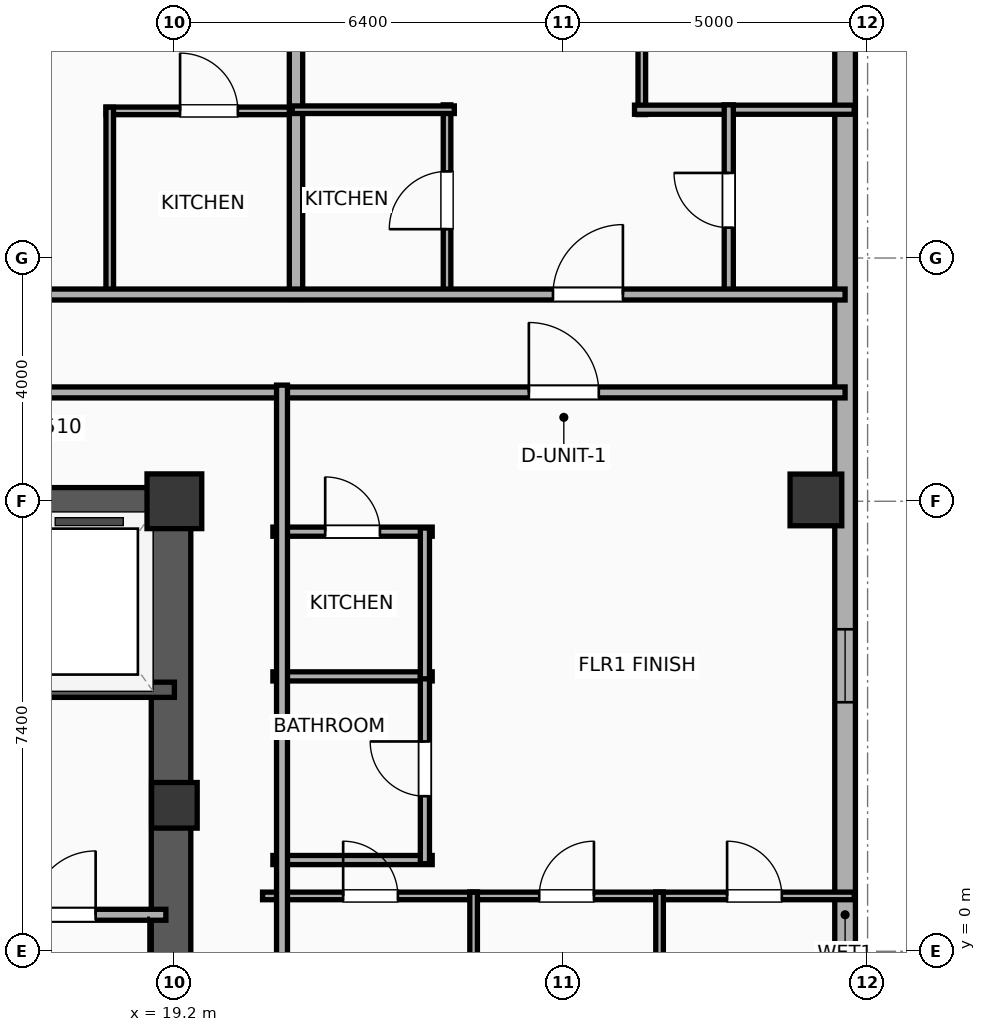
"""IFC4 building model, lengths in metres.
Left out: names, types, materials, properties, quantities, classifications, styles, units other than length and angle.
Written with IfcOpenShell. Run it as: python <this file> out.ifc"""

import sys

from ifc_helpers import new_model, si_unit, direction, frame, frame_2d, origin, origin_2d, place, context, subcontext, project, spatial, rectangle, hollow_rectangle, extrude, element, fill, save


model = new_model("IFC4")
c1 = context("Model", 3, precision=1e-05, world=origin(), true_north=direction((0.0, 1.0)))
c2 = subcontext(c1, "Body", "Model", "MODEL_VIEW")
j1 = project(units=[si_unit("LENGTHUNIT", "METRE"), si_unit("PLANEANGLEUNIT", "RADIAN")], contexts=[c1])
p1 = place(None, origin())
s1 = spatial("IfcSite", under=j1, at=p1, CompositionType="ELEMENT")
p2 = place(p1, origin())
s2 = spatial("IfcBuilding", under=s1, at=p2, CompositionType="ELEMENT")
p3 = place(p2, frame((0.0, 0.0, 219.7)))
s3 = spatial("IfcBuildingStorey", under=s2, at=p3, CompositionType="ELEMENT", Elevation=219.7)
p4 = place(p3, frame((19.2, 2.4, 0.0), z_axis=(0.0, 0.0, 1.0), x_axis=(1.0, 0.0, 0.0)))
e1 = element("IfcColumn", 1, at=p4, inside=s3, PredefinedType="COLUMN", context=c2, shape_type="SweptSolid", body=[
    extrude(rectangle(XDim=0.75, YDim=0.75, at=origin_2d()), origin(), (0.0, 0.0, 1.0), 3.9),
])
p5 = place(p3, frame((19.2, 7.4, 0.0), z_axis=(0.0, 0.0, 1.0), x_axis=(1.0, 0.0, 0.0)))
e2 = element("IfcColumn", 2, at=p5, inside=s3, PredefinedType="COLUMN", context=c2, shape_type="SweptSolid", body=[
    extrude(rectangle(XDim=0.9, YDim=0.9, at=origin_2d()), origin(), (0.0, 0.0, 1.0), 3.9),
])
p6 = place(p3, frame((12.175, 7.4, 0.0), z_axis=(0.0, 0.0, 1.0), x_axis=(1.0, 0.0, 0.0)))
e3 = element("IfcWall", 3, at=p6, inside=s3, PredefinedType="SHEAR", context=c2, shape_type="SweptSolid", body=[
    extrude(rectangle(XDim=7.25, YDim=0.45, at=frame_2d((3.625, 0.0))), origin(), (0.0, 0.0, 1.0), 3.65),
])
p7 = place(p3, frame((19.145, -7.4, 0.0), z_axis=(0.0, 0.0, 1.0), x_axis=(0.0, 1.0, 0.0)))
e4 = element("IfcWall", 4, at=p7, inside=s3, PredefinedType="SHEAR", context=c2, shape_type="SweptSolid", body=[
    extrude(rectangle(XDim=14.8, YDim=0.65, at=frame_2d((7.4, 0.0))), origin(), (0.0, 0.0, 1.0), 3.65),
])
p8 = place(p3, frame((29.75, 7.422, 0.0), z_axis=(0.0, 0.0, 1.0), x_axis=(1.0, 0.0, 0.0)))
e5 = element("IfcColumn", 5, at=p8, inside=s3, PredefinedType="COLUMN", context=c2, shape_type="SweptSolid", body=[
    extrude(hollow_rectangle(XDim=0.85, YDim=0.85, WallThickness=0.028, at=origin_2d()), origin(), (0.0, 0.0, 1.0), 3.9),
])
p9 = place(p3, frame((30.23, 16.583, 0.0), z_axis=(0.0, 0.0, 1.0), x_axis=(0.0, -1.0, 0.0)))
e6 = element("IfcWall", 6, at=p9, inside=s3, PredefinedType="ELEMENTEDWALL", context=c2, shape_type="SweptSolid", body=[
    extrude(rectangle(XDim=31.967, YDim=0.34, at=frame_2d((15.983, 0.0))), origin(), (0.0, 0.0, 1.0), 3.65),
])
p10 = place(p9, frame((30.132, 0.0, 0.75)))
e7 = element("IfcOpeningElement", 7, at=p10, cuts=e6, PredefinedType="OPENING", context=c2, shape_type="SweptSolid", body=[
    extrude(rectangle(XDim=1.2, YDim=2.05, at=frame_2d((0.6, 1.025))), frame((0.0, 0.18, 0.0), z_axis=(0.0, -1.0, 0.0), x_axis=(1.0, 0.0, 0.0)), (0.0, 0.0, 1.0), 0.36),
])
p11 = place(p9, frame((11.288, 0.0, 0.75)))
e8 = element("IfcOpeningElement", 8, at=p11, cuts=e6, PredefinedType="OPENING", context=c2, shape_type="SweptSolid", body=[
    extrude(rectangle(XDim=1.2, YDim=2.05, at=frame_2d((0.6, 1.025))), frame((0.0, 0.18, 0.0), z_axis=(0.0, -1.0, 0.0), x_axis=(1.0, 0.0, 0.0)), (0.0, 0.0, 1.0), 0.36),
])
p12 = place(p9, frame((20.538, 0.0, 0.75)))
e9 = element("IfcOpeningElement", 9, at=p12, cuts=e6, PredefinedType="OPENING", context=c2, shape_type="SweptSolid", body=[
    extrude(rectangle(XDim=1.2, YDim=2.05, at=frame_2d((0.6, 1.025))), frame((0.0, 0.18, 0.0), z_axis=(0.0, -1.0, 0.0), x_axis=(1.0, 0.0, 0.0)), (0.0, 0.0, 1.0), 0.36),
])
p13 = place(p3, frame((16.6, 4.3, 0.0), z_axis=(0.0, 0.0, 1.0), x_axis=(1.0, 0.0, 0.0)))
e10 = element("IfcWall", 10, at=p13, inside=s3, PredefinedType="SOLIDWALL", context=c2, shape_type="SweptSolid", body=[
    extrude(rectangle(XDim=2.6, YDim=0.25, at=frame_2d((1.3, 0.0))), origin(), (0.0, 0.0, 1.0), 3.65),
])
p14 = place(p3, frame((15.7, 0.6, 0.0), z_axis=(0.0, 0.0, 1.0), x_axis=(1.0, 0.0, 0.0)))
e11 = element("IfcWall", 11, at=p14, inside=s3, PredefinedType="PARTITIONING", context=c2, shape_type="SweptSolid", body=[
    extrude(rectangle(XDim=3.36, YDim=0.18, at=frame_2d((1.68, 0.0))), origin(), (0.0, 0.0, 1.0), 3.65),
])
p15 = place(p14, frame((1.155, 0.0, 0.0)))
e12 = element("IfcOpeningElement", 12, at=p15, cuts=e11, PredefinedType="OPENING", context=c2, shape_type="SweptSolid", body=[
    extrude(rectangle(XDim=1.05, YDim=2.05, at=frame_2d((0.525, 1.025))), frame((0.0, 0.1, 0.0), z_axis=(0.0, -1.0, 0.0), x_axis=(1.0, 0.0, 0.0)), (0.0, 0.0, 1.0), 0.2),
])
p16 = place(p3, frame((9.88, 9.19, 0.0), z_axis=(0.0, 0.0, 1.0), x_axis=(1.0, 0.0, 0.0)))
e13 = element("IfcWall", 13, at=p16, inside=s3, PredefinedType="PARTITIONING", context=c2, shape_type="SweptSolid", body=[
    extrude(rectangle(XDim=20.35, YDim=0.18, at=frame_2d((10.175, 0.0))), origin(), (0.0, 0.0, 1.0), 3.65),
])
p17 = place(p16, frame((15.149, 0.0, 0.0)))
e14 = element("IfcOpeningElement", 14, at=p17, cuts=e13, PredefinedType="OPENING", context=c2, shape_type="SweptSolid", body=[
    extrude(rectangle(XDim=1.15, YDim=2.05, at=frame_2d((0.575, 1.025))), frame((0.0, 0.1, 0.0), z_axis=(0.0, -1.0, 0.0), x_axis=(1.0, 0.0, 0.0)), (0.0, 0.0, 1.0), 0.2),
])
p18 = place(p3, frame((18.077, 13.82, 0.0), z_axis=(0.0, 0.0, 1.0), x_axis=(1.0, 0.0, 0.0)))
e15 = element("IfcWall", 15, at=p18, inside=s3, PredefinedType="PARTITIONING", context=c2, shape_type="SweptSolid", body=[
    extrude(rectangle(XDim=3.186, YDim=0.125, at=frame_2d((1.593, 0.0))), origin(), (0.0, 0.0, 1.0), 3.65),
])
p19 = place(p18, frame((1.217, 0.0, 0.0)))
e16 = element("IfcOpeningElement", 16, at=p19, cuts=e15, PredefinedType="OPENING", context=c2, shape_type="SweptSolid", body=[
    extrude(rectangle(XDim=0.95, YDim=2.05, at=frame_2d((0.475, 1.025))), frame((0.0, 0.073, 0.0), z_axis=(0.0, -1.0, 0.0), x_axis=(1.0, 0.0, 0.0)), (0.0, 0.0, 1.0), 0.145),
])
p20 = place(p3, frame((18.137, 10.78, 0.0), z_axis=(0.0, 0.0, 1.0), x_axis=(0.0, 1.0, 0.0)))
e17 = element("IfcWall", 17, at=p20, inside=s3, PredefinedType="PARTITIONING", context=c2, shape_type="SweptSolid", body=[
    extrude(rectangle(XDim=3.1, YDim=0.125, at=frame_2d((1.55, 0.0))), origin(), (0.0, 0.0, 1.0), 3.65),
])
p21 = place(p3, frame((21.2, 10.72, 0.0), z_axis=(0.0, 0.0, 1.0), x_axis=(0.0, 1.0, 0.0)))
e18 = element("IfcWall", 18, at=p21, inside=s3, PredefinedType="PARTITIONING", context=c2, shape_type="SweptSolid", body=[
    extrude(rectangle(XDim=9.31, YDim=0.22, at=frame_2d((4.655, 0.0))), origin(), (0.0, 0.0, 1.0), 3.65),
])
p22 = place(p3, frame((26.887, 13.759, 0.0), z_axis=(0.0, 0.0, 1.0), x_axis=(0.0, 1.0, 0.0)))
e19 = element("IfcWall", 19, at=p22, inside=s3, PredefinedType="PARTITIONING", context=c2, shape_type="SweptSolid", body=[
    extrude(rectangle(XDim=6.403, YDim=0.125, at=frame_2d((3.202, 0.0))), origin(), (0.0, 0.0, 1.0), 3.65),
])
p23 = place(p22, frame((1.087, 0.0, 0.0)))
e20 = element("IfcOpeningElement", 20, at=p23, cuts=e19, PredefinedType="OPENING", context=c2, shape_type="SweptSolid", body=[
    extrude(rectangle(XDim=0.9, YDim=2.05, at=frame_2d((0.45, 1.025))), frame((0.0, 0.073, 0.0), z_axis=(0.0, -1.0, 0.0), x_axis=(1.0, 0.0, 0.0)), (0.0, 0.0, 1.0), 0.145),
])
p24 = place(p3, frame((26.767, 13.839, 0.0), z_axis=(0.0, 0.0, 1.0), x_axis=(1.0, 0.0, 0.0)))
e21 = element("IfcWall", 21, at=p24, inside=s3, PredefinedType="PLUMBINGWALL", context=c2, shape_type="SweptSolid", body=[
    extrude(rectangle(XDim=3.613, YDim=0.15, at=frame_2d((1.806, 0.0))), origin(), (0.0, 0.0, 1.0), 3.65),
])
p25 = place(p3, frame((23.684, 10.78, 0.0), z_axis=(0.0, 0.0, 1.0), x_axis=(0.0, 1.0, 0.0)))
e22 = element("IfcWall", 22, at=p25, inside=s3, PredefinedType="PARTITIONING", context=c2, shape_type="SweptSolid", body=[
    extrude(rectangle(XDim=3.139, YDim=0.125, at=frame_2d((1.569, 0.0))), origin(), (0.0, 0.0, 1.0), 3.65),
])
p26 = place(p25, frame((1.094, 0.0, 0.0)))
e23 = element("IfcOpeningElement", 23, at=p26, cuts=e22, PredefinedType="OPENING", context=c2, shape_type="SweptSolid", body=[
    extrude(rectangle(XDim=0.95, YDim=2.05, at=frame_2d((0.475, 1.025))), frame((0.0, 0.073, 0.0), z_axis=(0.0, -1.0, 0.0), x_axis=(1.0, 0.0, 0.0)), (0.0, 0.0, 1.0), 0.145),
])
p27 = place(p3, frame((21.137, 13.839, 0.0), z_axis=(0.0, 0.0, 1.0), x_axis=(1.0, 0.0, 0.0)))
e24 = element("IfcWall", 24, at=p27, inside=s3, PredefinedType="PARTITIONING", context=c2, shape_type="SweptSolid", body=[
    extrude(rectangle(XDim=2.667, YDim=0.125, at=frame_2d((1.333, 0.0))), origin(), (0.0, 0.0, 1.0), 3.65),
])
p28 = place(p3, frame((28.317, 10.78, 0.0), z_axis=(0.0, 0.0, 1.0), x_axis=(0.0, 1.0, 0.0)))
e25 = element("IfcWall", 25, at=p28, inside=s3, PredefinedType="PLUMBINGWALL", context=c2, shape_type="SweptSolid", body=[
    extrude(rectangle(XDim=3.139, YDim=0.15, at=frame_2d((1.569, 0.0))), origin(), (0.0, 0.0, 1.0), 3.65),
])
p29 = place(p28, frame((1.119, 0.0, 0.0)))
e26 = element("IfcOpeningElement", 26, at=p29, cuts=e25, PredefinedType="OPENING", context=c2, shape_type="SweptSolid", body=[
    extrude(rectangle(XDim=0.9, YDim=2.05, at=frame_2d((0.45, 1.025))), frame((0.0, 0.085, 0.0), z_axis=(0.0, -1.0, 0.0), x_axis=(1.0, 0.0, 0.0)), (0.0, 0.0, 1.0), 0.17),
])
p30 = place(p3, frame((-26.23, 10.8, 0.0), z_axis=(0.0, 0.0, 1.0), x_axis=(1.0, 0.0, 0.0)))
e27 = element("IfcWall", 27, at=p30, inside=s3, PredefinedType="PARTITIONING", context=c2, shape_type="SweptSolid", body=[
    extrude(rectangle(XDim=56.46, YDim=0.18, at=frame_2d((28.23, 0.0))), origin(), (0.0, 0.0, 1.0), 3.65),
])
p31 = place(p30, frame((2.994, 0.0, 0.0)))
e28 = element("IfcOpeningElement", 28, at=p31, cuts=e27, PredefinedType="OPENING", context=c2, shape_type="SweptSolid", body=[
    extrude(rectangle(XDim=0.9, YDim=2.05, at=frame_2d((0.45, 1.025))), frame((0.0, 0.1, 0.0), z_axis=(0.0, -1.0, 0.0), x_axis=(1.0, 0.0, 0.0)), (0.0, 0.0, 1.0), 0.2),
])
p32 = place(p30, frame((11.745, 0.0, 0.0)))
e29 = element("IfcOpeningElement", 29, at=p32, cuts=e27, PredefinedType="OPENING", context=c2, shape_type="SweptSolid", body=[
    extrude(rectangle(XDim=1.15, YDim=2.05, at=frame_2d((0.575, 1.025))), frame((0.0, 0.1, 0.0), z_axis=(0.0, -1.0, 0.0), x_axis=(1.0, 0.0, 0.0)), (0.0, 0.0, 1.0), 0.2),
])
p33 = place(p30, frame((21.907, 0.0, 0.0)))
e30 = element("IfcOpeningElement", 30, at=p33, cuts=e27, PredefinedType="OPENING", context=c2, shape_type="SweptSolid", body=[
    extrude(rectangle(XDim=1.15, YDim=2.05, at=frame_2d((0.575, 1.025))), frame((0.0, 0.1, 0.0), z_axis=(0.0, -1.0, 0.0), x_axis=(1.0, 0.0, 0.0)), (0.0, 0.0, 1.0), 0.2),
])
p34 = place(p30, frame((32.516, 0.0, 0.0)))
e31 = element("IfcOpeningElement", 31, at=p34, cuts=e27, PredefinedType="OPENING", context=c2, shape_type="SweptSolid", body=[
    extrude(rectangle(XDim=1.15, YDim=2.05, at=frame_2d((0.575, 1.025))), frame((0.0, 0.1, 0.0), z_axis=(0.0, -1.0, 0.0), x_axis=(1.0, 0.0, 0.0)), (0.0, 0.0, 1.0), 0.2),
])
p35 = place(p30, frame((41.956, 0.0, 0.0)))
e32 = element("IfcOpeningElement", 32, at=p35, cuts=e27, PredefinedType="OPENING", context=c2, shape_type="SweptSolid", body=[
    extrude(rectangle(XDim=1.15, YDim=2.05, at=frame_2d((0.575, 1.025))), frame((0.0, 0.1, 0.0), z_axis=(0.0, -1.0, 0.0), x_axis=(1.0, 0.0, 0.0)), (0.0, 0.0, 1.0), 0.2),
])
p36 = place(p30, frame((51.656, 0.0, 0.0)))
e33 = element("IfcOpeningElement", 33, at=p36, cuts=e27, PredefinedType="OPENING", context=c2, shape_type="SweptSolid", body=[
    extrude(rectangle(XDim=1.15, YDim=2.05, at=frame_2d((0.575, 1.025))), frame((0.0, 0.1, 0.0), z_axis=(0.0, -1.0, 0.0), x_axis=(1.0, 0.0, 0.0)), (0.0, 0.0, 1.0), 0.2),
])
p37 = place(p3, frame((20.82, 6.9, 0.0), z_axis=(0.0, 0.0, 1.0), x_axis=(1.0, 0.0, 0.0)))
e34 = element("IfcWall", 34, at=p37, inside=s3, PredefinedType="PLUMBINGWALL", context=c2, shape_type="SweptSolid", body=[
    extrude(rectangle(XDim=2.62, YDim=0.15, at=frame_2d((1.31, 0.0))), origin(), (0.0, 0.0, 1.0), 3.65),
])
p38 = place(p37, frame((0.86, 0.0, 0.0)))
e35 = element("IfcOpeningElement", 35, at=p38, cuts=e34, PredefinedType="OPENING", context=c2, shape_type="SweptSolid", body=[
    extrude(rectangle(XDim=0.9, YDim=2.05, at=frame_2d((0.45, 1.025))), frame((0.0, 0.085, 0.0), z_axis=(0.0, -1.0, 0.0), x_axis=(1.0, 0.0, 0.0)), (0.0, 0.0, 1.0), 0.17),
])
for number, where, z_axis, x_axis in (
    (36, (20.82, 4.52, 0.0), (0.0, 0.0, 1.0), (1.0, 0.0, 0.0)),
    (37, (20.82, 1.5, 0.0), (0.0, 0.0, 1.0), (1.0, 0.0, 0.0)),
):
    element("IfcWall", number, at=place(p3, frame(where, z_axis=z_axis, x_axis=x_axis)), inside=s3, PredefinedType="PLUMBINGWALL", context=c2, shape_type="SweptSolid", body=[
        extrude(rectangle(XDim=2.62, YDim=0.15, at=frame_2d((1.31, 0.0))), origin(), (0.0, 0.0, 1.0), 3.65),
    ])
p39 = place(p3, frame((23.32, 1.44, 0.0), z_axis=(0.0, 0.0, 1.0), x_axis=(0.0, 1.0, 0.0)))
e38 = element("IfcWall", 38, at=p39, inside=s3, PredefinedType="PLUMBINGWALL", context=c2, shape_type="SweptSolid", body=[
    extrude(rectangle(XDim=3.12, YDim=0.15, at=frame_2d((1.56, 0.0))), origin(), (0.0, 0.0, 1.0), 3.65),
])
p40 = place(p39, frame((1.11, 0.0, 0.0)))
e39 = element("IfcOpeningElement", 39, at=p40, cuts=e38, PredefinedType="OPENING", context=c2, shape_type="SweptSolid", body=[
    extrude(rectangle(XDim=0.9, YDim=2.05, at=frame_2d((0.45, 1.025))), frame((0.0, 0.085, 0.0), z_axis=(0.0, -1.0, 0.0), x_axis=(1.0, 0.0, 0.0)), (0.0, 0.0, 1.0), 0.17),
])
p41 = place(p3, frame((23.32, 4.48, 0.0), z_axis=(0.0, 0.0, 1.0), x_axis=(0.0, 1.0, 0.0)))
e40 = element("IfcWall", 40, at=p41, inside=s3, PredefinedType="PLUMBINGWALL", context=c2, shape_type="SweptSolid", body=[
    extrude(rectangle(XDim=2.48, YDim=0.15, at=frame_2d((1.24, 0.0))), origin(), (0.0, 0.0, 1.0), 3.65),
])
p42 = place(p3, frame((20.65, 0.91, 0.0), z_axis=(0.0, 0.0, 1.0), x_axis=(1.0, 0.0, 0.0)))
e41 = element("IfcWall", 41, at=p42, inside=s3, PredefinedType="PARTITIONING", context=c2, shape_type="SweptSolid", body=[
    extrude(rectangle(XDim=3.534, YDim=0.125, at=frame_2d((1.767, 0.0))), origin(), (0.0, 0.0, 1.0), 3.65),
])
p43 = place(p42, frame((1.325, 0.0, 0.0)))
e42 = element("IfcOpeningElement", 42, at=p43, cuts=e41, PredefinedType="OPENING", context=c2, shape_type="SweptSolid", body=[
    extrude(rectangle(XDim=0.9, YDim=2.05, at=frame_2d((0.45, 1.025))), frame((0.0, 0.073, 0.0), z_axis=(0.0, -1.0, 0.0), x_axis=(1.0, 0.0, 0.0)), (0.0, 0.0, 1.0), 0.145),
])
p44 = place(p3, frame((24.059, 0.91, 0.0), z_axis=(0.0, 0.0, 1.0), x_axis=(1.0, 0.0, 0.0)))
e43 = element("IfcWall", 43, at=p44, inside=s3, PredefinedType="PARTITIONING", context=c2, shape_type="SweptSolid", body=[
    extrude(rectangle(XDim=3.183, YDim=0.125, at=frame_2d((1.591, 0.0))), origin(), (0.0, 0.0, 1.0), 3.65),
])
p45 = place(p44, frame((1.142, 0.0, 0.0)))
e44 = element("IfcOpeningElement", 44, at=p45, cuts=e43, PredefinedType="OPENING", context=c2, shape_type="SweptSolid", body=[
    extrude(rectangle(XDim=0.9, YDim=2.05, at=frame_2d((0.45, 1.025))), frame((0.0, 0.073, 0.0), z_axis=(0.0, -1.0, 0.0), x_axis=(1.0, 0.0, 0.0)), (0.0, 0.0, 1.0), 0.145),
])
p46 = place(p3, frame((27.116, 0.91, 0.0), z_axis=(0.0, 0.0, 1.0), x_axis=(1.0, 0.0, 0.0)))
e45 = element("IfcWall", 45, at=p46, inside=s3, PredefinedType="PARTITIONING", context=c2, shape_type="SweptSolid", body=[
    extrude(rectangle(XDim=3.263, YDim=0.125, at=frame_2d((1.632, 0.0))), origin(), (0.0, 0.0, 1.0), 3.65),
])
p47 = place(p46, frame((1.173, 0.0, 0.0)))
e46 = element("IfcOpeningElement", 46, at=p47, cuts=e45, PredefinedType="OPENING", context=c2, shape_type="SweptSolid", body=[
    extrude(rectangle(XDim=0.9, YDim=2.05, at=frame_2d((0.45, 1.025))), frame((0.0, 0.073, 0.0), z_axis=(0.0, -1.0, 0.0), x_axis=(1.0, 0.0, 0.0)), (0.0, 0.0, 1.0), 0.145),
])
for number, where, z_axis, x_axis in (
    (47, (27.179, -9.51, 0.0), (0.0, 0.0, 1.0), (0.0, 1.0, 0.0)),
    (48, (24.121, -9.51, 0.0), (0.0, 0.0, 1.0), (0.0, 1.0, 0.0)),
):
    element("IfcWall", number, at=place(p3, frame(where, z_axis=z_axis, x_axis=x_axis)), inside=s3, PredefinedType="PARTITIONING", context=c2, shape_type="SweptSolid", body=[
        extrude(rectangle(XDim=10.48, YDim=0.125, at=frame_2d((5.24, 0.0))), origin(), (0.0, 0.0, 1.0), 3.65),
    ])
p48 = place(p3, frame((20.97, -9.31, 0.0), z_axis=(0.0, 0.0, 1.0), x_axis=(0.0, 1.0, 0.0)))
e49 = element("IfcWall", 49, at=p48, inside=s3, PredefinedType="PARTITIONING", context=c2, shape_type="SweptSolid", body=[
    extrude(rectangle(XDim=18.62, YDim=0.18, at=frame_2d((9.31, 0.0))), origin(), (0.0, 0.0, 1.0), 3.65),
])
p49 = place(p11, origin())
e50 = element("IfcWindow", 50, at=p49, inside=s3, PartitioningType="SINGLE_PANEL", PredefinedType="WINDOW", context=c2, shape_type="SweptSolid", body=[
    extrude(rectangle(XDim=1.2, YDim=2.05, at=frame_2d((0.6, 1.025))), frame((0.0, 0.03, 0.0), z_axis=(0.0, -1.0, 0.0), x_axis=(1.0, 0.0, 0.0)), (0.0, 0.0, 1.0), 0.06),
])
fill(e8, e50)
p50 = place(p15, origin())
e51 = element("IfcDoor", 51, at=p50, inside=s3, OperationType="SINGLE_SWING_RIGHT", PredefinedType="DOOR", context=c2, shape_type="SweptSolid", body=[
    extrude(rectangle(XDim=1.05, YDim=2.05, at=frame_2d((0.525, 1.025))), frame((0.0, 0.025, 0.0), z_axis=(0.0, -1.0, 0.0), x_axis=(1.0, 0.0, 0.0)), (0.0, 0.0, 1.0), 0.05),
])
fill(e12, e51)
p51 = place(p17, origin())
e52 = element("IfcDoor", 52, at=p51, inside=s3, OperationType="SINGLE_SWING_LEFT", PredefinedType="DOOR", context=c2, shape_type="SweptSolid", body=[
    extrude(rectangle(XDim=1.15, YDim=2.05, at=frame_2d((0.575, 1.025))), frame((0.0, 0.025, 0.0), z_axis=(0.0, -1.0, 0.0), x_axis=(1.0, 0.0, 0.0)), (0.0, 0.0, 1.0), 0.05),
])
fill(e14, e52)
p52 = place(p19, origin())
e53 = element("IfcDoor", 53, at=p52, inside=s3, OperationType="SINGLE_SWING_LEFT", PredefinedType="DOOR", context=c2, shape_type="SweptSolid", body=[
    extrude(rectangle(XDim=0.95, YDim=2.05, at=frame_2d((0.475, 1.025))), frame((0.0, 0.025, 0.0), z_axis=(0.0, -1.0, 0.0), x_axis=(1.0, 0.0, 0.0)), (0.0, 0.0, 1.0), 0.05),
])
fill(e16, e53)
p53 = place(p26, origin())
e54 = element("IfcDoor", 54, at=p53, inside=s3, OperationType="SINGLE_SWING_LEFT", PredefinedType="DOOR", context=c2, shape_type="SweptSolid", body=[
    extrude(rectangle(XDim=0.95, YDim=2.05, at=frame_2d((0.475, 1.025))), frame((0.0, 0.025, 0.0), z_axis=(0.0, -1.0, 0.0), x_axis=(1.0, 0.0, 0.0)), (0.0, 0.0, 1.0), 0.05),
])
fill(e23, e54)
p54 = place(p29, origin())
e55 = element("IfcDoor", 55, at=p54, inside=s3, OperationType="SINGLE_SWING_RIGHT", PredefinedType="DOOR", context=c2, shape_type="SweptSolid", body=[
    extrude(rectangle(XDim=0.9, YDim=2.05, at=frame_2d((0.45, 1.025))), frame((0.0, 0.025, 0.0), z_axis=(0.0, -1.0, 0.0), x_axis=(1.0, 0.0, 0.0)), (0.0, 0.0, 1.0), 0.05),
])
fill(e26, e55)
p55 = place(p36, origin())
e56 = element("IfcDoor", 56, at=p55, inside=s3, OperationType="SINGLE_SWING_RIGHT", PredefinedType="DOOR", context=c2, shape_type="SweptSolid", body=[
    extrude(rectangle(XDim=1.15, YDim=2.05, at=frame_2d((0.575, 1.025))), frame((0.0, 0.025, 0.0), z_axis=(0.0, -1.0, 0.0), x_axis=(1.0, 0.0, 0.0)), (0.0, 0.0, 1.0), 0.05),
])
fill(e33, e56)
p56 = place(p38, origin())
e57 = element("IfcDoor", 57, at=p56, inside=s3, OperationType="SINGLE_SWING_LEFT", PredefinedType="DOOR", context=c2, shape_type="SweptSolid", body=[
    extrude(rectangle(XDim=0.9, YDim=2.05, at=frame_2d((0.45, 1.025))), frame((0.0, 0.025, 0.0), z_axis=(0.0, -1.0, 0.0), x_axis=(1.0, 0.0, 0.0)), (0.0, 0.0, 1.0), 0.05),
])
fill(e35, e57)
p57 = place(p40, origin())
e58 = element("IfcDoor", 58, at=p57, inside=s3, OperationType="SINGLE_SWING_RIGHT", PredefinedType="DOOR", context=c2, shape_type="SweptSolid", body=[
    extrude(rectangle(XDim=0.9, YDim=2.05, at=frame_2d((0.45, 1.025))), frame((0.0, 0.025, 0.0), z_axis=(0.0, -1.0, 0.0), x_axis=(1.0, 0.0, 0.0)), (0.0, 0.0, 1.0), 0.05),
])
fill(e39, e58)
p58 = place(p43, origin())
e59 = element("IfcDoor", 59, at=p58, inside=s3, OperationType="SINGLE_SWING_LEFT", PredefinedType="DOOR", context=c2, shape_type="SweptSolid", body=[
    extrude(rectangle(XDim=0.9, YDim=2.05, at=frame_2d((0.45, 1.025))), frame((0.0, 0.025, 0.0), z_axis=(0.0, -1.0, 0.0), x_axis=(1.0, 0.0, 0.0)), (0.0, 0.0, 1.0), 0.05),
])
fill(e42, e59)
p59 = place(p45, origin())
e60 = element("IfcDoor", 60, at=p59, inside=s3, OperationType="SINGLE_SWING_RIGHT", PredefinedType="DOOR", context=c2, shape_type="SweptSolid", body=[
    extrude(rectangle(XDim=0.9, YDim=2.05, at=frame_2d((0.45, 1.025))), frame((0.0, 0.025, 0.0), z_axis=(0.0, -1.0, 0.0), x_axis=(1.0, 0.0, 0.0)), (0.0, 0.0, 1.0), 0.05),
])
fill(e44, e60)
p60 = place(p47, origin())
e61 = element("IfcDoor", 61, at=p60, inside=s3, OperationType="SINGLE_SWING_LEFT", PredefinedType="DOOR", context=c2, shape_type="SweptSolid", body=[
    extrude(rectangle(XDim=0.9, YDim=2.05, at=frame_2d((0.45, 1.025))), frame((0.0, 0.025, 0.0), z_axis=(0.0, -1.0, 0.0), x_axis=(1.0, 0.0, 0.0)), (0.0, 0.0, 1.0), 0.05),
])
fill(e46, e61)
save(model, sys.argv[1])
